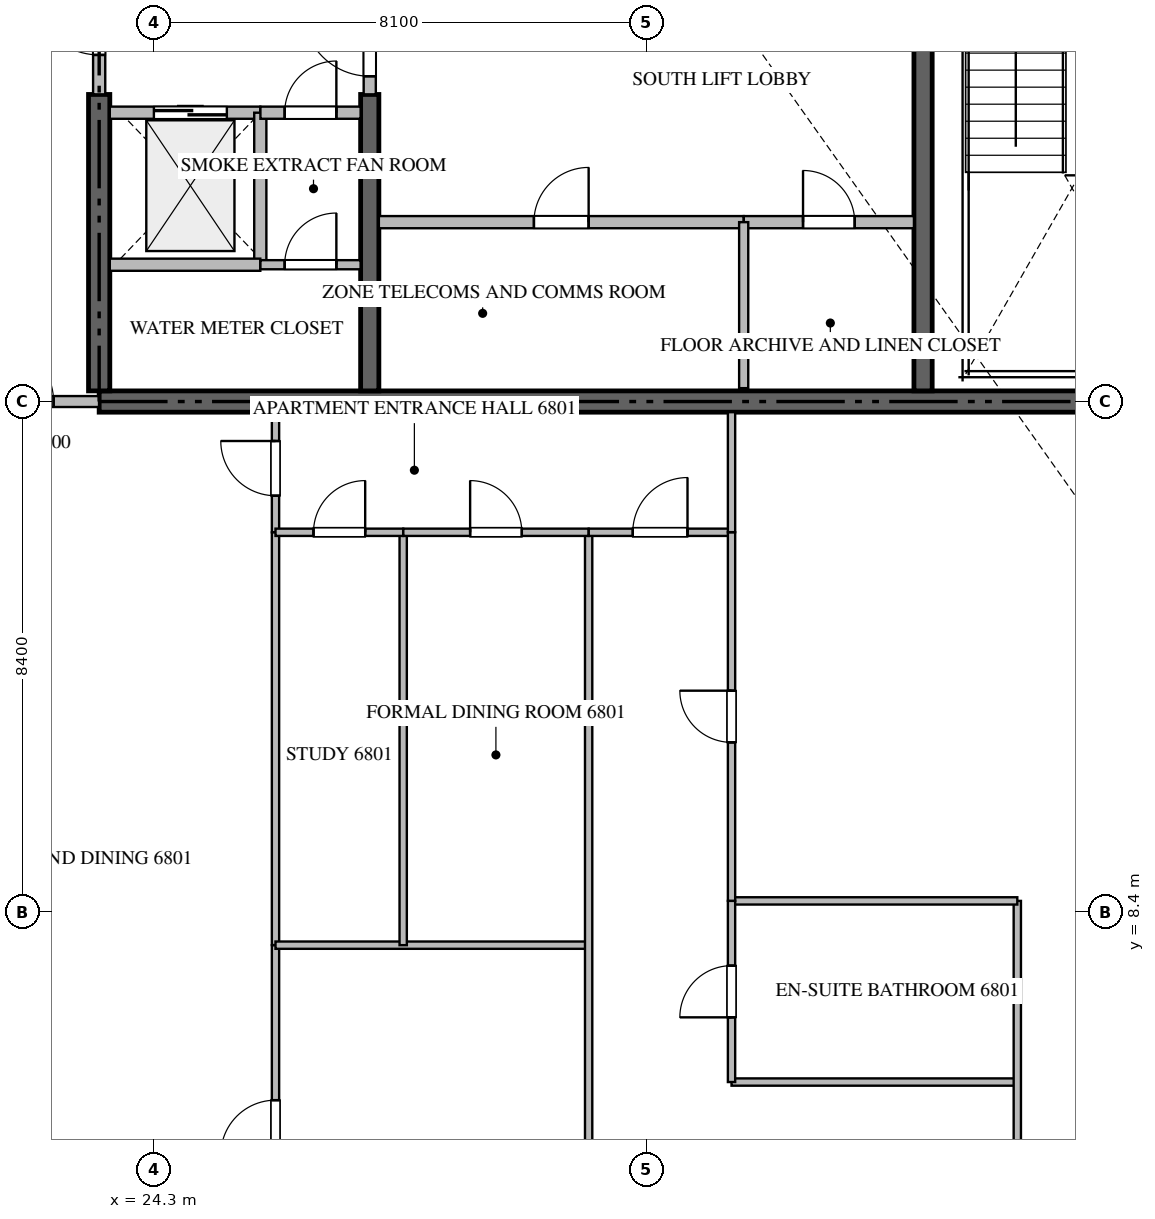
"""IFC4 building model, lengths in metres.
Left out: names, types, materials, properties, quantities, classifications, styles, units other than length and angle.
Written with IfcOpenShell. Run it as: python <this file> out.ifc"""

import sys

from ifc_helpers import new_model, si_unit, direction, frame, frame_2d, origin, place, context, subcontext, project, spatial, rectangle, extrude, source, transform, mapped, element, fill, save


model = new_model("IFC4")
c1 = context("Model", 3, precision=1e-05, world=origin(), true_north=direction((0.0, 1.0)))
c2 = subcontext(c1, "Body", "Model", "MODEL_VIEW")
j1 = project(units=[si_unit("LENGTHUNIT", "METRE"), si_unit("PLANEANGLEUNIT", "RADIAN")], contexts=[c1])
p1 = place(None, origin())
s1 = spatial("IfcSite", under=j1, at=p1, CompositionType="ELEMENT")
p2 = place(p1, origin())
s2 = spatial("IfcBuilding", under=s1, at=p2, CompositionType="ELEMENT")
p3 = place(p2, frame((0.0, 0.0, 272.05)))
s3 = spatial("IfcBuildingStorey", under=s2, at=p3, CompositionType="ELEMENT", Elevation=272.05)
p4 = place(p3, frame((23.4, 16.8, -0.26), z_axis=(0.0, 0.0, 1.0), x_axis=(1.0, 0.0, 0.0)))
e1 = element("IfcWall", 1, at=p4, inside=s3, PredefinedType="SHEAR", context=c2, shape_type="SweptSolid", body=[
    extrude(rectangle(XDim=18.0, YDim=0.35, at=frame_2d((9.0, 0.0))), origin(), (0.0, 0.0, 1.0), 3.848),
])
p5 = place(p3, frame((23.4, 16.975, -0.26), z_axis=(0.0, 0.0, 1.0), x_axis=(0.0, 1.0, 0.0)))
e2 = element("IfcWall", 2, at=p5, inside=s3, PredefinedType="SHEAR", context=c2, shape_type="SweptSolid", body=[
    extrude(rectangle(XDim=4.875, YDim=0.35, at=frame_2d((2.438, 0.0))), origin(), (0.0, 0.0, 1.0), 3.848),
])
p6 = place(p3, frame((27.85, 16.975, -0.26), z_axis=(0.0, 0.0, 1.0), x_axis=(0.0, 1.0, 0.0)))
e3 = element("IfcWall", 3, at=p6, inside=s3, PredefinedType="SHEAR", context=c2, shape_type="SweptSolid", body=[
    extrude(rectangle(XDim=4.875, YDim=0.3, at=frame_2d((2.438, 0.0))), origin(), (0.0, 0.0, 1.0), 3.848),
])
p7 = place(p3, frame((36.95, 16.975, -0.26), z_axis=(0.0, 0.0, 1.0), x_axis=(0.0, 1.0, 0.0)))
e4 = element("IfcWall", 4, at=p7, inside=s3, PredefinedType="SHEAR", context=c2, shape_type="SweptSolid", body=[
    extrude(rectangle(XDim=8.375, YDim=0.3, at=frame_2d((4.188, 0.0))), origin(), (0.0, 0.0, 1.0), 3.848),
])
p8 = place(p3, frame((23.575, 21.55, 0.0), z_axis=(0.0, 0.0, 1.0), x_axis=(1.0, 0.0, 0.0)))
e5 = element("IfcWall", 5, at=p8, inside=s3, PredefinedType="STANDARD", context=c2, shape_type="SweptSolid", body=[
    extrude(rectangle(XDim=2.475, YDim=0.2, at=frame_2d((1.238, 0.0))), origin(), (0.0, 0.0, 1.0), 3.59),
])
p9 = place(p8, frame((0.725, 0.0, 0.0)))
e6 = element("IfcOpeningElement", 6, at=p9, cuts=e5, PredefinedType="OPENING", context=c2, shape_type="SweptSolid", body=[
    extrude(rectangle(XDim=1.2, YDim=2.2, at=frame_2d((0.6, 1.1))), frame((0.0, 0.11, 0.0), z_axis=(0.0, -1.0, 0.0), x_axis=(1.0, 0.0, 0.0)), (0.0, 0.0, 1.0), 0.22),
])
p10 = place(p3, frame((26.05, 19.05, 0.0), z_axis=(0.0, 0.0, 1.0), x_axis=(0.0, 1.0, 0.0)))
e7 = element("IfcWall", 7, at=p10, inside=s3, PredefinedType="STANDARD", context=c2, shape_type="SweptSolid", body=[
    extrude(rectangle(XDim=2.5, YDim=0.2, at=frame_2d((1.25, 0.0))), origin(), (0.0, 0.0, 1.0), 3.59),
])
p11 = place(p3, frame((23.575, 19.05, 0.0), z_axis=(0.0, 0.0, 1.0), x_axis=(1.0, 0.0, 0.0)))
e8 = element("IfcWall", 8, at=p11, inside=s3, PredefinedType="STANDARD", context=c2, shape_type="SweptSolid", body=[
    extrude(rectangle(XDim=2.475, YDim=0.2, at=frame_2d((1.238, 0.0))), origin(), (0.0, 0.0, 1.0), 3.59),
])
p12 = place(p3, frame((26.052, 21.55, 0.0), z_axis=(0.0, 0.0, 1.0), x_axis=(1.0, 0.0, 0.0)))
e9 = element("IfcWall", 9, at=p12, inside=s3, PredefinedType="STANDARD", context=c2, shape_type="SweptSolid", body=[
    extrude(rectangle(XDim=1.648, YDim=0.2, at=frame_2d((0.824, 0.0))), origin(), (0.0, 0.0, 1.0), 3.59),
])
p13 = place(p12, frame((0.399, 0.0, 0.0)))
e10 = element("IfcOpeningElement", 10, at=p13, cuts=e9, PredefinedType="OPENING", context=c2, shape_type="SweptSolid", body=[
    extrude(rectangle(XDim=0.85, YDim=2.1, at=frame_2d((0.425, 1.05))), frame((0.0, 0.11, 0.0), z_axis=(0.0, -1.0, 0.0), x_axis=(1.0, 0.0, 0.0)), (0.0, 0.0, 1.0), 0.22),
])
p14 = place(p3, frame((23.4, 21.852, 0.0), z_axis=(0.0, 0.0, 1.0), x_axis=(0.0, 1.0, 0.0)))
e11 = element("IfcWall", 11, at=p14, inside=s3, PredefinedType="STANDARD", context=c2, shape_type="SweptSolid", body=[
    extrude(rectangle(XDim=2.396, YDim=0.2, at=frame_2d((1.198, 0.0))), origin(), (0.0, 0.0, 1.0), 3.59),
])
p15 = place(p14, frame((0.648, 0.0, 0.0)))
e12 = element("IfcOpeningElement", 12, at=p15, cuts=e11, PredefinedType="OPENING", context=c2, shape_type="SweptSolid", body=[
    extrude(rectangle(XDim=1.1, YDim=2.15, at=frame_2d((0.55, 1.075))), frame((0.0, 0.11, 0.0), z_axis=(0.0, -1.0, 0.0), x_axis=(1.0, 0.0, 0.0)), (0.0, 0.0, 1.0), 0.22),
])
p16 = place(p3, frame((27.85, 21.852, 0.0), z_axis=(0.0, 0.0, 1.0), x_axis=(0.0, 1.0, 0.0)))
e13 = element("IfcWall", 13, at=p16, inside=s3, PredefinedType="STANDARD", context=c2, shape_type="SweptSolid", body=[
    extrude(rectangle(XDim=1.696, YDim=0.2, at=frame_2d((0.848, 0.0))), origin(), (0.0, 0.0, 1.0), 3.59),
])
p17 = place(p16, frame((0.298, 0.0, 0.0)))
e14 = element("IfcOpeningElement", 14, at=p17, cuts=e13, PredefinedType="OPENING", context=c2, shape_type="SweptSolid", body=[
    extrude(rectangle(XDim=1.1, YDim=2.15, at=frame_2d((0.55, 1.075))), frame((0.0, 0.11, 0.0), z_axis=(0.0, -1.0, 0.0), x_axis=(1.0, 0.0, 0.0)), (0.0, 0.0, 1.0), 0.22),
])
p18 = place(p3, frame((26.052, 19.05, 0.0), z_axis=(0.0, 0.0, 1.0), x_axis=(1.0, 0.0, 0.0)))
e15 = element("IfcWall", 15, at=p18, inside=s3, PredefinedType="PARTITIONING", context=c2, shape_type="SweptSolid", body=[
    extrude(rectangle(XDim=1.648, YDim=0.15, at=frame_2d((0.824, 0.0))), origin(), (0.0, 0.0, 1.0), 3.59),
])
p19 = place(p18, frame((0.399, 0.0, 0.0)))
e16 = element("IfcOpeningElement", 16, at=p19, cuts=e15, PredefinedType="OPENING", context=c2, shape_type="SweptSolid", body=[
    extrude(rectangle(XDim=0.85, YDim=2.1, at=frame_2d((0.425, 1.05))), frame((0.0, 0.085, 0.0), z_axis=(0.0, -1.0, 0.0), x_axis=(1.0, 0.0, 0.0)), (0.0, 0.0, 1.0), 0.17),
])
p20 = place(p3, frame((28.0, 19.75, 0.0), z_axis=(0.0, 0.0, 1.0), x_axis=(1.0, 0.0, 0.0)))
e17 = element("IfcWall", 17, at=p20, inside=s3, PredefinedType="STANDARD", context=c2, shape_type="SweptSolid", body=[
    extrude(rectangle(XDim=6.0, YDim=0.2, at=frame_2d((3.0, 0.0))), origin(), (0.0, 0.0, 1.0), 3.59),
])
p21 = place(p20, frame((2.55, 0.0, 0.0)))
e18 = element("IfcOpeningElement", 18, at=p21, cuts=e17, PredefinedType="OPENING", context=c2, shape_type="SweptSolid", body=[
    extrude(rectangle(XDim=0.9, YDim=2.1, at=frame_2d((0.45, 1.05))), frame((0.0, 0.11, 0.0), z_axis=(0.0, -1.0, 0.0), x_axis=(1.0, 0.0, 0.0)), (0.0, 0.0, 1.0), 0.22),
])
p22 = place(p3, frame((34.002, 19.75, 0.0), z_axis=(0.0, 0.0, 1.0), x_axis=(1.0, 0.0, 0.0)))
e19 = element("IfcWall", 19, at=p22, inside=s3, PredefinedType="STANDARD", context=c2, shape_type="SweptSolid", body=[
    extrude(rectangle(XDim=2.798, YDim=0.2, at=frame_2d((1.399, 0.0))), origin(), (0.0, 0.0, 1.0), 3.59),
])
p23 = place(p22, frame((0.974, 0.0, 0.0)))
e20 = element("IfcOpeningElement", 20, at=p23, cuts=e19, PredefinedType="OPENING", context=c2, shape_type="SweptSolid", body=[
    extrude(rectangle(XDim=0.85, YDim=2.1, at=frame_2d((0.425, 1.05))), frame((0.0, 0.11, 0.0), z_axis=(0.0, -1.0, 0.0), x_axis=(1.0, 0.0, 0.0)), (0.0, 0.0, 1.0), 0.22),
])
p24 = place(p3, frame((34.0, 17.02, 0.0), z_axis=(0.0, 0.0, 1.0), x_axis=(0.0, 1.0, 0.0)))
e21 = element("IfcWall", 21, at=p24, inside=s3, PredefinedType="PARTITIONING", context=c2, shape_type="SweptSolid", body=[
    extrude(rectangle(XDim=2.73, YDim=0.15, at=frame_2d((1.365, 0.0))), origin(), (0.0, 0.0, 1.0), 3.59),
])
p25 = place(p3, frame((20.902, 16.8, 0.0), z_axis=(0.0, 0.0, 1.0), x_axis=(1.0, 0.0, 0.0)))
e22 = element("IfcWall", 22, at=p25, inside=s3, PredefinedType="PARTITIONING", context=c2, shape_type="SweptSolid", body=[
    extrude(rectangle(XDim=2.496, YDim=0.18, at=frame_2d((1.248, 0.0))), origin(), (0.0, 0.0, 1.0), 3.59),
])
p26 = place(p25, frame((0.748, 0.0, 0.0)))
e23 = element("IfcOpeningElement", 23, at=p26, cuts=e22, PredefinedType="OPENING", context=c2, shape_type="SweptSolid", body=[
    extrude(rectangle(XDim=1.0, YDim=2.15, at=frame_2d((0.5, 1.075))), frame((0.0, 0.1, 0.0), z_axis=(0.0, -1.0, 0.0), x_axis=(1.0, 0.0, 0.0)), (0.0, 0.0, 1.0), 0.2),
])
p27 = place(p3, frame((26.3, 14.65, 0.0), z_axis=(0.0, 0.0, 1.0), x_axis=(0.0, 1.0, 0.0)))
e24 = element("IfcWall", 24, at=p27, inside=s3, PredefinedType="PARTITIONING", context=c2, shape_type="SweptSolid", body=[
    extrude(rectangle(XDim=1.975, YDim=0.12, at=frame_2d((0.988, 0.0))), origin(), (0.0, 0.0, 1.0), 3.59),
])
p28 = place(p27, frame((0.601, 0.0, 0.0)))
e25 = element("IfcOpeningElement", 25, at=p28, cuts=e24, PredefinedType="OPENING", context=c2, shape_type="SweptSolid", body=[
    extrude(rectangle(XDim=0.9, YDim=2.1, at=frame_2d((0.45, 1.05))), frame((0.0, 0.07, 0.0), z_axis=(0.0, -1.0, 0.0), x_axis=(1.0, 0.0, 0.0)), (0.0, 0.0, 1.0), 0.14),
])
p29 = place(p3, frame((26.3, 1.295, 0.0), z_axis=(0.0, 0.0, 1.0), x_axis=(0.0, 1.0, 0.0)))
e26 = element("IfcWall", 26, at=p29, inside=s3, PredefinedType="PARTITIONING", context=c2, shape_type="SweptSolid", body=[
    extrude(rectangle(XDim=6.565, YDim=0.12, at=frame_2d((3.283, 0.0))), origin(), (0.0, 0.0, 1.0), 3.59),
])
p30 = place(p29, frame((3.116, 0.0, 0.0)))
e27 = element("IfcOpeningElement", 27, at=p30, cuts=e26, PredefinedType="OPENING", context=c2, shape_type="SweptSolid", body=[
    extrude(rectangle(XDim=0.9, YDim=2.1, at=frame_2d((0.45, 1.05))), frame((0.0, 0.07, 0.0), z_axis=(0.0, -1.0, 0.0), x_axis=(1.0, 0.0, 0.0)), (0.0, 0.0, 1.0), 0.14),
])
p31 = place(p3, frame((26.3, 7.862, 0.0), z_axis=(0.0, 0.0, 1.0), x_axis=(0.0, 1.0, 0.0)))
e28 = element("IfcWall", 28, at=p31, inside=s3, PredefinedType="PARTITIONING", context=c2, shape_type="SweptSolid", body=[
    extrude(rectangle(XDim=6.786, YDim=0.12, at=frame_2d((3.393, 0.0))), origin(), (0.0, 0.0, 1.0), 3.59),
])
p32 = place(p3, frame((26.3, 7.86, 0.0), z_axis=(0.0, 0.0, 1.0), x_axis=(1.0, 0.0, 0.0)))
e29 = element("IfcWall", 29, at=p32, inside=s3, PredefinedType="PARTITIONING", context=c2, shape_type="SweptSolid", body=[
    extrude(rectangle(XDim=5.15, YDim=0.12, at=frame_2d((2.575, 0.0))), origin(), (0.0, 0.0, 1.0), 3.59),
])
p33 = place(p3, frame((31.45, 1.295, 0.0), z_axis=(0.0, 0.0, 1.0), x_axis=(0.0, 1.0, 0.0)))
e30 = element("IfcWall", 30, at=p33, inside=s3, PredefinedType="PARTITIONING", context=c2, shape_type="SweptSolid", body=[
    extrude(rectangle(XDim=13.355, YDim=0.12, at=frame_2d((6.677, 0.0))), origin(), (0.0, 0.0, 1.0), 3.59),
])
p34 = place(p3, frame((28.4, 7.86, 0.0), z_axis=(0.0, 0.0, 1.0), x_axis=(0.0, 1.0, 0.0)))
e31 = element("IfcWall", 31, at=p34, inside=s3, PredefinedType="PARTITIONING", context=c2, shape_type="SweptSolid", body=[
    extrude(rectangle(XDim=6.79, YDim=0.12, at=frame_2d((3.395, 0.0))), origin(), (0.0, 0.0, 1.0), 3.59),
])
p35 = place(p3, frame((26.3, 14.65, 0.0), z_axis=(0.0, 0.0, 1.0), x_axis=(1.0, 0.0, 0.0)))
e32 = element("IfcWall", 32, at=p35, inside=s3, PredefinedType="PARTITIONING", context=c2, shape_type="SweptSolid", body=[
    extrude(rectangle(XDim=2.1, YDim=0.12, at=frame_2d((1.05, 0.0))), origin(), (0.0, 0.0, 1.0), 3.59),
])
p36 = place(p35, frame((0.625, 0.0, 0.0)))
e33 = element("IfcOpeningElement", 33, at=p36, cuts=e32, PredefinedType="OPENING", context=c2, shape_type="SweptSolid", body=[
    extrude(rectangle(XDim=0.85, YDim=2.1, at=frame_2d((0.425, 1.05))), frame((0.0, 0.07, 0.0), z_axis=(0.0, -1.0, 0.0), x_axis=(1.0, 0.0, 0.0)), (0.0, 0.0, 1.0), 0.14),
])
p37 = place(p3, frame((28.402, 14.65, 0.0), z_axis=(0.0, 0.0, 1.0), x_axis=(1.0, 0.0, 0.0)))
e34 = element("IfcWall", 34, at=p37, inside=s3, PredefinedType="PARTITIONING", context=c2, shape_type="SweptSolid", body=[
    extrude(rectangle(XDim=3.048, YDim=0.12, at=frame_2d((1.524, 0.0))), origin(), (0.0, 0.0, 1.0), 3.59),
])
p38 = place(p37, frame((1.099, 0.0, 0.0)))
e35 = element("IfcOpeningElement", 35, at=p38, cuts=e34, PredefinedType="OPENING", context=c2, shape_type="SweptSolid", body=[
    extrude(rectangle(XDim=0.85, YDim=2.1, at=frame_2d((0.425, 1.05))), frame((0.0, 0.07, 0.0), z_axis=(0.0, -1.0, 0.0), x_axis=(1.0, 0.0, 0.0)), (0.0, 0.0, 1.0), 0.14),
])
p39 = place(p3, frame((31.452, 14.65, 0.0), z_axis=(0.0, 0.0, 1.0), x_axis=(1.0, 0.0, 0.0)))
e36 = element("IfcWall", 36, at=p39, inside=s3, PredefinedType="PARTITIONING", context=c2, shape_type="SweptSolid", body=[
    extrude(rectangle(XDim=2.348, YDim=0.12, at=frame_2d((1.174, 0.0))), origin(), (0.0, 0.0, 1.0), 3.59),
])
p40 = place(p39, frame((0.724, 0.0, 0.0)))
e37 = element("IfcOpeningElement", 37, at=p40, cuts=e36, PredefinedType="OPENING", context=c2, shape_type="SweptSolid", body=[
    extrude(rectangle(XDim=0.9, YDim=2.1, at=frame_2d((0.45, 1.05))), frame((0.0, 0.07, 0.0), z_axis=(0.0, -1.0, 0.0), x_axis=(1.0, 0.0, 0.0)), (0.0, 0.0, 1.0), 0.14),
])
p41 = place(p3, frame((33.8, 5.609, 0.0), z_axis=(0.0, 0.0, 1.0), x_axis=(1.0, 0.0, 0.0)))
e38 = element("IfcWall", 38, at=p41, inside=s3, PredefinedType="PARTITIONING", context=c2, shape_type="SweptSolid", body=[
    extrude(rectangle(XDim=4.7, YDim=0.12, at=frame_2d((2.35, 0.0))), origin(), (0.0, 0.0, 1.0), 3.59),
])
p42 = place(p3, frame((38.5, 1.295, 0.0), z_axis=(0.0, 0.0, 1.0), x_axis=(0.0, 1.0, 0.0)))
e39 = element("IfcWall", 39, at=p42, inside=s3, PredefinedType="PARTITIONING", context=c2, shape_type="SweptSolid", body=[
    extrude(rectangle(XDim=7.293, YDim=0.12, at=frame_2d((3.646, 0.0))), origin(), (0.0, 0.0, 1.0), 3.59),
])
p43 = place(p3, frame((33.8, 8.588, 0.0), z_axis=(0.0, 0.0, 1.0), x_axis=(1.0, 0.0, 0.0)))
e40 = element("IfcWall", 40, at=p43, inside=s3, PredefinedType="PARTITIONING", context=c2, shape_type="SweptSolid", body=[
    extrude(rectangle(XDim=4.7, YDim=0.12, at=frame_2d((2.35, 0.0))), origin(), (0.0, 0.0, 1.0), 3.59),
])
p44 = place(p3, frame((33.8, 5.609, 0.0), z_axis=(0.0, 0.0, 1.0), x_axis=(0.0, 1.0, 0.0)))
e41 = element("IfcWall", 41, at=p44, inside=s3, PredefinedType="PARTITIONING", context=c2, shape_type="SweptSolid", body=[
    extrude(rectangle(XDim=2.979, YDim=0.12, at=frame_2d((1.49, 0.0))), origin(), (0.0, 0.0, 1.0), 3.59),
])
p45 = place(p44, frame((1.064, 0.0, 0.0)))
e42 = element("IfcOpeningElement", 42, at=p45, cuts=e41, PredefinedType="OPENING", context=c2, shape_type="SweptSolid", body=[
    extrude(rectangle(XDim=0.85, YDim=2.1, at=frame_2d((0.425, 1.05))), frame((0.0, 0.07, 0.0), z_axis=(0.0, -1.0, 0.0), x_axis=(1.0, 0.0, 0.0)), (0.0, 0.0, 1.0), 0.14),
])
p46 = place(p3, frame((33.8, 8.59, 0.0), z_axis=(0.0, 0.0, 1.0), x_axis=(0.0, 1.0, 0.0)))
e43 = element("IfcWall", 43, at=p46, inside=s3, PredefinedType="PARTITIONING", context=c2, shape_type="SweptSolid", body=[
    extrude(rectangle(XDim=6.06, YDim=0.12, at=frame_2d((3.03, 0.0))), origin(), (0.0, 0.0, 1.0), 3.59),
])
p47 = place(p46, frame((2.605, 0.0, 0.0)))
e44 = element("IfcOpeningElement", 44, at=p47, cuts=e43, PredefinedType="OPENING", context=c2, shape_type="SweptSolid", body=[
    extrude(rectangle(XDim=0.85, YDim=2.1, at=frame_2d((0.425, 1.05))), frame((0.0, 0.07, 0.0), z_axis=(0.0, -1.0, 0.0), x_axis=(1.0, 0.0, 0.0)), (0.0, 0.0, 1.0), 0.14),
])
p48 = place(p3, frame((33.8, 14.652, 0.0), z_axis=(0.0, 0.0, 1.0), x_axis=(0.0, 1.0, 0.0)))
e45 = element("IfcWall", 45, at=p48, inside=s3, PredefinedType="PARTITIONING", context=c2, shape_type="SweptSolid", body=[
    extrude(rectangle(XDim=1.973, YDim=0.12, at=frame_2d((0.986, 0.0))), origin(), (0.0, 0.0, 1.0), 3.59),
])
m1 = source(origin(), c2, "Body", "SweptSolid", [
    extrude(rectangle(XDim=1.2, YDim=2.2, at=frame_2d((0.6, 1.1))), frame((0.0, 0.025, 0.0), z_axis=(0.0, -1.0, 0.0), x_axis=(1.0, 0.0, 0.0)), (0.0, 0.0, 1.0), 0.05),
])
p49 = place(p9, origin())
e46 = element("IfcDoor", 46, at=p49, inside=s3, OperationType="DOUBLE_DOOR_SLIDING", PredefinedType="DOOR", context=c2, shape_type="MappedRepresentation", body=[
    mapped(m1, transform((0.0, 0.0, 0.0), scale=1.0)),
])
fill(e6, e46)
m2 = source(origin(), c2, "Body", "SweptSolid", [
    extrude(rectangle(XDim=0.85, YDim=2.1, at=frame_2d((0.425, 1.05))), frame((0.0, 0.025, 0.0), z_axis=(0.0, -1.0, 0.0), x_axis=(1.0, 0.0, 0.0)), (0.0, 0.0, 1.0), 0.05),
])
p50 = place(p13, origin())
e47 = element("IfcDoor", 47, at=p50, inside=s3, OperationType="SINGLE_SWING_RIGHT", PredefinedType="DOOR", context=c2, shape_type="MappedRepresentation", body=[
    mapped(m2, transform((0.0, 0.0, 0.0), scale=1.0)),
])
fill(e10, e47)
m3 = source(origin(), c2, "Body", "SweptSolid", [
    extrude(rectangle(XDim=1.1, YDim=2.15, at=frame_2d((0.55, 1.075))), frame((0.0, 0.025, 0.0), z_axis=(0.0, -1.0, 0.0), x_axis=(1.0, 0.0, 0.0)), (0.0, 0.0, 1.0), 0.05),
])
p51 = place(p15, origin())
e48 = element("IfcDoor", 48, at=p51, inside=s3, OperationType="SINGLE_SWING_RIGHT", PredefinedType="DOOR", context=c2, shape_type="MappedRepresentation", body=[
    mapped(m3, transform((0.0, 0.0, 0.0), scale=1.0)),
])
fill(e12, e48)
p52 = place(p17, origin())
e49 = element("IfcDoor", 49, at=p52, inside=s3, OperationType="SINGLE_SWING_RIGHT", PredefinedType="DOOR", context=c2, shape_type="MappedRepresentation", body=[
    mapped(m3, transform((0.0, 0.0, 0.0), scale=1.0)),
])
fill(e14, e49)
p53 = place(p19, origin())
e50 = element("IfcDoor", 50, at=p53, inside=s3, OperationType="SINGLE_SWING_RIGHT", PredefinedType="DOOR", context=c2, shape_type="MappedRepresentation", body=[
    mapped(m2, transform((0.0, 0.0, 0.0), scale=1.0)),
])
fill(e16, e50)
m4 = source(origin(), c2, "Body", "SweptSolid", [
    extrude(rectangle(XDim=0.9, YDim=2.1, at=frame_2d((0.45, 1.05))), frame((0.0, 0.025, 0.0), z_axis=(0.0, -1.0, 0.0), x_axis=(1.0, 0.0, 0.0)), (0.0, 0.0, 1.0), 0.05),
])
p54 = place(p21, origin())
e51 = element("IfcDoor", 51, at=p54, inside=s3, OperationType="SINGLE_SWING_RIGHT", PredefinedType="DOOR", context=c2, shape_type="MappedRepresentation", body=[
    mapped(m4, transform((0.0, 0.0, 0.0), scale=1.0)),
])
fill(e18, e51)
p55 = place(p23, origin())
e52 = element("IfcDoor", 52, at=p55, inside=s3, OperationType="SINGLE_SWING_LEFT", PredefinedType="DOOR", context=c2, shape_type="MappedRepresentation", body=[
    mapped(m2, transform((0.0, 0.0, 0.0), scale=1.0)),
])
fill(e20, e52)
m5 = source(origin(), c2, "Body", "SweptSolid", [
    extrude(rectangle(XDim=1.0, YDim=2.15, at=frame_2d((0.5, 1.075))), frame((0.0, 0.025, 0.0), z_axis=(0.0, -1.0, 0.0), x_axis=(1.0, 0.0, 0.0)), (0.0, 0.0, 1.0), 0.05),
])
p56 = place(p26, origin())
e53 = element("IfcDoor", 53, at=p56, inside=s3, OperationType="SINGLE_SWING_LEFT", PredefinedType="DOOR", context=c2, shape_type="MappedRepresentation", body=[
    mapped(m5, transform((0.0, 0.0, 0.0), scale=1.0)),
])
fill(e23, e53)
p57 = place(p28, origin())
e54 = element("IfcDoor", 54, at=p57, inside=s3, OperationType="SINGLE_SWING_RIGHT", PredefinedType="DOOR", context=c2, shape_type="MappedRepresentation", body=[
    mapped(m4, transform((0.0, 0.0, 0.0), scale=1.0)),
])
fill(e25, e54)
p58 = place(p30, origin())
e55 = element("IfcDoor", 55, at=p58, inside=s3, OperationType="SINGLE_SWING_LEFT", PredefinedType="DOOR", context=c2, shape_type="MappedRepresentation", body=[
    mapped(m4, transform((0.0, 0.0, 0.0), scale=1.0)),
])
fill(e27, e55)
p59 = place(p36, origin())
e56 = element("IfcDoor", 56, at=p59, inside=s3, OperationType="SINGLE_SWING_RIGHT", PredefinedType="DOOR", context=c2, shape_type="MappedRepresentation", body=[
    mapped(m2, transform((0.0, 0.0, 0.0), scale=1.0)),
])
fill(e33, e56)
p60 = place(p38, origin())
e57 = element("IfcDoor", 57, at=p60, inside=s3, OperationType="SINGLE_SWING_LEFT", PredefinedType="DOOR", context=c2, shape_type="MappedRepresentation", body=[
    mapped(m2, transform((0.0, 0.0, 0.0), scale=1.0)),
])
fill(e35, e57)
p61 = place(p40, origin())
e58 = element("IfcDoor", 58, at=p61, inside=s3, OperationType="SINGLE_SWING_RIGHT", PredefinedType="DOOR", context=c2, shape_type="MappedRepresentation", body=[
    mapped(m4, transform((0.0, 0.0, 0.0), scale=1.0)),
])
fill(e37, e58)
p62 = place(p45, origin())
e59 = element("IfcDoor", 59, at=p62, inside=s3, OperationType="SINGLE_SWING_LEFT", PredefinedType="DOOR", context=c2, shape_type="MappedRepresentation", body=[
    mapped(m2, transform((0.0, 0.0, 0.0), scale=1.0)),
])
fill(e42, e59)
p63 = place(p47, origin())
e60 = element("IfcDoor", 60, at=p63, inside=s3, OperationType="SINGLE_SWING_RIGHT", PredefinedType="DOOR", context=c2, shape_type="MappedRepresentation", body=[
    mapped(m2, transform((0.0, 0.0, 0.0), scale=1.0)),
])
fill(e44, e60)
save(model, sys.argv[1])
